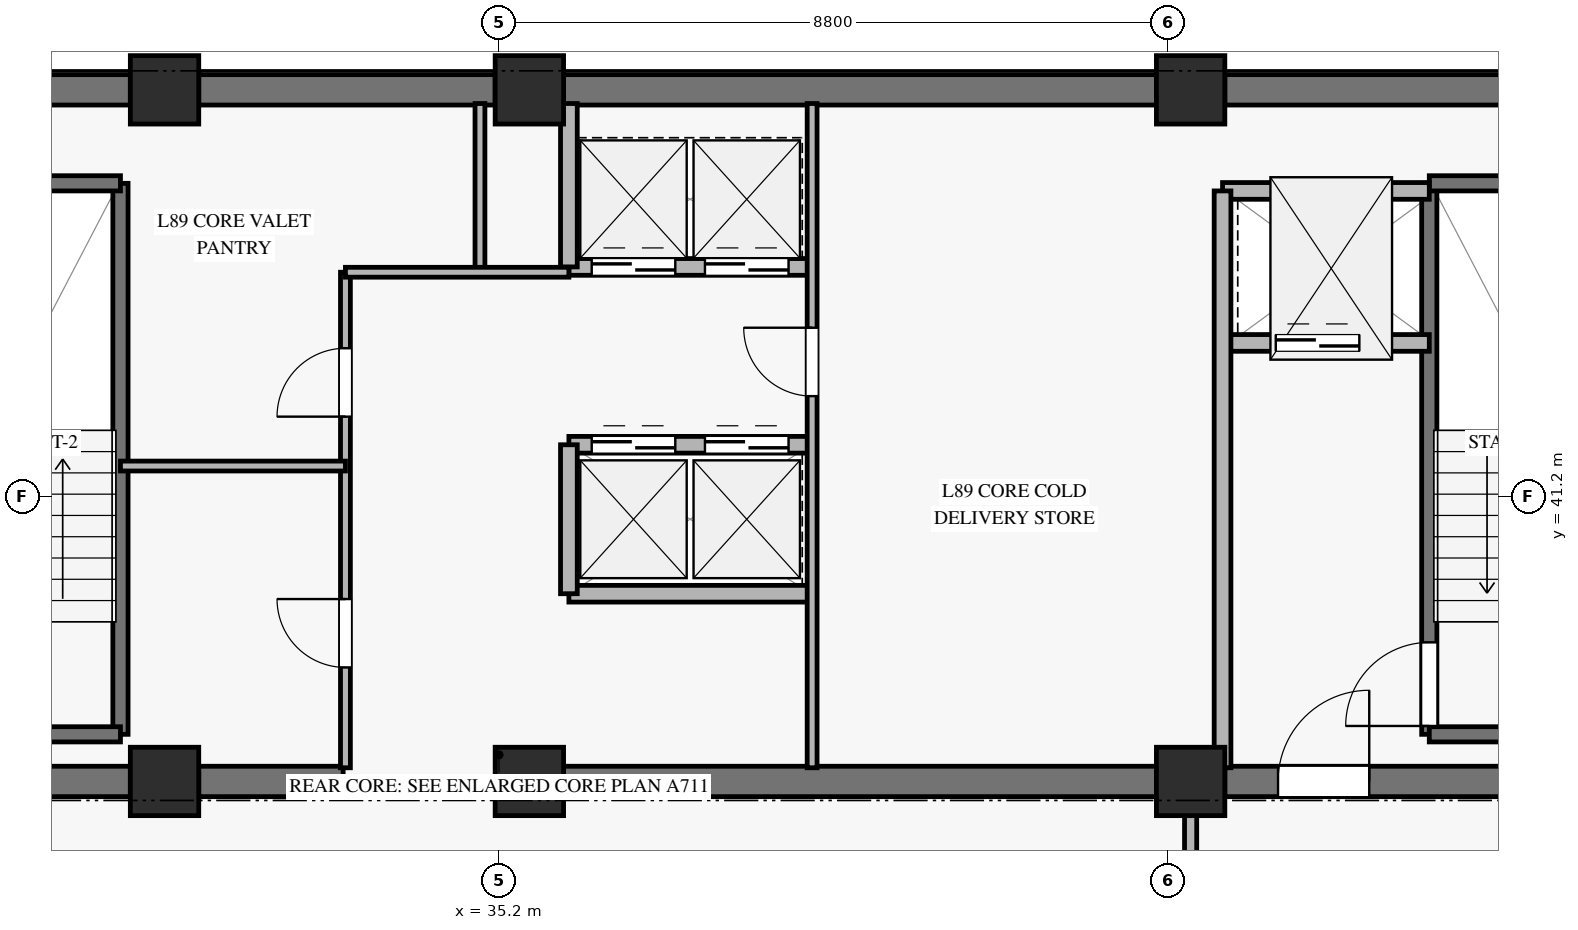
"""IFC4 building model, lengths in metres.
Left out: names, types, materials, properties, quantities, classifications, styles, units other than length and angle.
Written with IfcOpenShell. Run it as: python <this file> out.ifc"""

import sys

from ifc_helpers import new_model, si_unit, direction, frame, frame_2d, origin, origin_2d, place, context, subcontext, project, spatial, rectangle, extrude, source, transform, mapped, element, fill, save


model = new_model("IFC4")
c1 = context("Model", 3, precision=1e-05, world=origin(), true_north=direction((0.0, 1.0)))
c2 = subcontext(c1, "Body", "Model", "MODEL_VIEW")
j1 = project(units=[si_unit("LENGTHUNIT", "METRE"), si_unit("PLANEANGLEUNIT", "RADIAN")], contexts=[c1])
p1 = place(None, origin())
s1 = spatial("IfcSite", under=j1, at=p1, CompositionType="ELEMENT")
p2 = place(p1, origin())
s2 = spatial("IfcBuilding", under=s1, at=p2, CompositionType="ELEMENT")
p3 = place(p2, frame((0.0, 0.0, 342.5)))
s3 = spatial("IfcBuildingStorey", under=s2, at=p3, CompositionType="ELEMENT", Elevation=342.5)
m1 = source(origin(), c2, "Body", "SweptSolid", [
    extrude(rectangle(XDim=0.9, YDim=0.9, at=origin_2d()), origin(), (0.0, 0.0, 1.0), 3.185),
])
for number, where, z_axis, x_axis in (
    (1, (30.8, 37.45, 0.0), (0.0, 0.0, 1.0), (1.0, 0.0, 0.0)),
    (2, (30.8, 46.55, 0.0), (0.0, 0.0, 1.0), (1.0, 0.0, 0.0)),
    (3, (35.6, 37.45, 0.0), (0.0, 0.0, 1.0), (1.0, 0.0, 0.0)),
    (4, (35.6, 46.55, 0.0), (0.0, 0.0, 1.0), (1.0, 0.0, 0.0)),
    (5, (44.3, 37.45, 0.0), (0.0, 0.0, 1.0), (1.0, 0.0, 0.0)),
    (6, (44.3, 46.55, 0.0), (0.0, 0.0, 1.0), (1.0, 0.0, 0.0)),
):
    element("IfcColumn", number, at=place(p3, frame(where, z_axis=z_axis, x_axis=x_axis)), inside=s3, PredefinedType="PILASTER", context=c2, shape_type="MappedRepresentation", body=[
        mapped(m1, transform((0.0, 0.0, 0.0), x_axis=(1.0, 0.0, 0.0), y_axis=(0.0, 1.0, 0.0), z_axis=(0.0, 0.0, 1.0), scale=1.0)),
    ])
p4 = place(p3, frame((20.3, 46.55, 0.0), z_axis=(0.0, 0.0, 1.0), x_axis=(1.0, 0.0, 0.0)))
e7 = element("IfcWall", 7, at=p4, inside=s3, PredefinedType="SHEAR", context=c2, shape_type="SweptSolid", body=[
    extrude(rectangle(XDim=10.05, YDim=0.4, at=frame_2d((5.025, 0.0))), origin(), (0.0, 0.0, 1.0), 3.185),
])
p5 = place(p3, frame((31.25, 46.55, 0.0), z_axis=(0.0, 0.0, 1.0), x_axis=(1.0, 0.0, 0.0)))
e8 = element("IfcWall", 8, at=p5, inside=s3, PredefinedType="SHEAR", context=c2, shape_type="SweptSolid", body=[
    extrude(rectangle(XDim=3.9, YDim=0.4, at=frame_2d((1.95, 0.0))), origin(), (0.0, 0.0, 1.0), 3.185),
])
p6 = place(p3, frame((36.05, 46.55, 0.0), z_axis=(0.0, 0.0, 1.0), x_axis=(1.0, 0.0, 0.0)))
e9 = element("IfcWall", 9, at=p6, inside=s3, PredefinedType="SHEAR", context=c2, shape_type="SweptSolid", body=[
    extrude(rectangle(XDim=7.8, YDim=0.4, at=frame_2d((3.9, 0.0))), origin(), (0.0, 0.0, 1.0), 3.185),
])
p7 = place(p3, frame((44.75, 46.55, 0.0), z_axis=(0.0, 0.0, 1.0), x_axis=(1.0, 0.0, 0.0)))
e10 = element("IfcWall", 10, at=p7, inside=s3, PredefinedType="SHEAR", context=c2, shape_type="SweptSolid", body=[
    extrude(rectangle(XDim=5.35, YDim=0.4, at=frame_2d((2.675, 0.0))), origin(), (0.0, 0.0, 1.0), 3.185),
])
p8 = place(p3, frame((20.3, 37.45, 0.0), z_axis=(0.0, 0.0, 1.0), x_axis=(1.0, 0.0, 0.0)))
e11 = element("IfcWall", 11, at=p8, inside=s3, PredefinedType="SHEAR", context=c2, shape_type="SweptSolid", body=[
    extrude(rectangle(XDim=10.05, YDim=0.4, at=frame_2d((5.025, 0.0))), origin(), (0.0, 0.0, 1.0), 3.185),
])
p9 = place(p8, frame((4.25, 0.0, 0.0)))
e12 = element("IfcOpeningElement", 12, at=p9, cuts=e11, PredefinedType="OPENING", context=c2, shape_type="SweptSolid", body=[
    extrude(rectangle(XDim=1.2, YDim=2.15, at=frame_2d((0.6, 1.075))), frame((0.0, 0.21, 0.0), z_axis=(0.0, -1.0, 0.0), x_axis=(1.0, 0.0, 0.0)), (0.0, 0.0, 1.0), 0.42),
])
p10 = place(p3, frame((31.25, 37.45, 0.0), z_axis=(0.0, 0.0, 1.0), x_axis=(1.0, 0.0, 0.0)))
e13 = element("IfcWall", 13, at=p10, inside=s3, PredefinedType="SHEAR", context=c2, shape_type="SweptSolid", body=[
    extrude(rectangle(XDim=1.9, YDim=0.4, at=frame_2d((0.95, 0.0))), origin(), (0.0, 0.0, 1.0), 3.185),
])
p11 = place(p3, frame((36.05, 37.45, 0.0), z_axis=(0.0, 0.0, 1.0), x_axis=(1.0, 0.0, 0.0)))
e14 = element("IfcWall", 14, at=p11, inside=s3, PredefinedType="SHEAR", context=c2, shape_type="SweptSolid", body=[
    extrude(rectangle(XDim=7.8, YDim=0.4, at=frame_2d((3.9, 0.0))), origin(), (0.0, 0.0, 1.0), 3.185),
])
p12 = place(p3, frame((44.75, 37.45, 0.0), z_axis=(0.0, 0.0, 1.0), x_axis=(1.0, 0.0, 0.0)))
e15 = element("IfcWall", 15, at=p12, inside=s3, PredefinedType="SHEAR", context=c2, shape_type="SweptSolid", body=[
    extrude(rectangle(XDim=5.35, YDim=0.4, at=frame_2d((2.675, 0.0))), origin(), (0.0, 0.0, 1.0), 3.185),
])
p13 = place(p12, frame((0.7, 0.0, 0.0)))
e16 = element("IfcOpeningElement", 16, at=p13, cuts=e15, PredefinedType="OPENING", context=c2, shape_type="SweptSolid", body=[
    extrude(rectangle(XDim=1.2, YDim=2.15, at=frame_2d((0.6, 1.075))), frame((0.0, 0.21, 0.0), z_axis=(0.0, -1.0, 0.0), x_axis=(1.0, 0.0, 0.0)), (0.0, 0.0, 1.0), 0.42),
])
p14 = place(p3, frame((30.22, 38.07, 0.0), z_axis=(0.0, 0.0, 1.0), x_axis=(0.0, 1.0, 0.0)))
e17 = element("IfcWall", 17, at=p14, inside=s3, PredefinedType="SOLIDWALL", context=c2, shape_type="SweptSolid", body=[
    extrude(rectangle(XDim=7.25, YDim=0.2, at=frame_2d((3.625, 0.0))), origin(), (0.0, 0.0, 1.0), 3.4),
])
for number, where, z_axis, x_axis in (
    (18, (27.14, 45.32, 0.0), (0.0, 0.0, 1.0), (1.0, 0.0, 0.0)),
    (19, (27.14, 38.07, 0.0), (0.0, 0.0, 1.0), (1.0, 0.0, 0.0)),
):
    element("IfcWall", number, at=place(p3, frame(where, z_axis=z_axis, x_axis=x_axis)), inside=s3, PredefinedType="SOLIDWALL", context=c2, shape_type="SweptSolid", body=[
        extrude(rectangle(XDim=3.08, YDim=0.2, at=frame_2d((1.54, 0.0))), origin(), (0.0, 0.0, 1.0), 3.4),
    ])
p15 = place(p3, frame((47.44, 38.07, 0.0), z_axis=(0.0, 0.0, 1.0), x_axis=(0.0, 1.0, 0.0)))
e20 = element("IfcWall", 20, at=p15, inside=s3, PredefinedType="SOLIDWALL", context=c2, shape_type="SweptSolid", body=[
    extrude(rectangle(XDim=7.25, YDim=0.2, at=frame_2d((3.625, 0.0))), origin(), (0.0, 0.0, 1.0), 3.4),
])
p16 = place(p15, frame((0.11, 0.0, 0.0)))
e21 = element("IfcOpeningElement", 21, at=p16, cuts=e20, PredefinedType="OPENING", context=c2, shape_type="SweptSolid", body=[
    extrude(rectangle(XDim=1.1, YDim=2.15, at=frame_2d((0.55, 1.075))), frame((0.0, 0.11, 0.0), z_axis=(0.0, -1.0, 0.0), x_axis=(1.0, 0.0, 0.0)), (0.0, 0.0, 1.0), 0.22),
])
for number, where, z_axis, x_axis in (
    (22, (47.44, 45.32, 0.0), (0.0, 0.0, 1.0), (1.0, 0.0, 0.0)),
    (23, (47.44, 38.07, 0.0), (0.0, 0.0, 1.0), (1.0, 0.0, 0.0)),
):
    element("IfcWall", number, at=place(p3, frame(where, z_axis=z_axis, x_axis=x_axis)), inside=s3, PredefinedType="SOLIDWALL", context=c2, shape_type="SweptSolid", body=[
        extrude(rectangle(XDim=2.93, YDim=0.2, at=frame_2d((1.465, 0.0))), origin(), (0.0, 0.0, 1.0), 3.4),
    ])
p17 = place(p3, frame((44.72, 43.22, 0.0), z_axis=(0.0, 0.0, 1.0), x_axis=(1.0, 0.0, 0.0)))
e24 = element("IfcWall", 24, at=p17, inside=s3, PredefinedType="SOLIDWALL", context=c2, shape_type="SweptSolid", body=[
    extrude(rectangle(XDim=2.72, YDim=0.22, at=frame_2d((1.36, 0.0))), origin(), (0.0, 0.0, 1.0), 3.185),
])
p18 = place(p17, frame((0.7, 0.0, 0.0)))
e25 = element("IfcOpeningElement", 25, at=p18, cuts=e24, PredefinedType="OPENING", context=c2, shape_type="SweptSolid", body=[
    extrude(rectangle(XDim=1.1, YDim=2.2, at=frame_2d((0.55, 1.1))), frame((0.0, 0.12, 0.0), z_axis=(0.0, -1.0, 0.0), x_axis=(1.0, 0.0, 0.0)), (0.0, 0.0, 1.0), 0.24),
])
p19 = place(p3, frame((44.72, 45.22, 0.0), z_axis=(0.0, 0.0, 1.0), x_axis=(1.0, 0.0, 0.0)))
e26 = element("IfcWall", 26, at=p19, inside=s3, PredefinedType="SOLIDWALL", context=c2, shape_type="SweptSolid", body=[
    extrude(rectangle(XDim=2.72, YDim=0.22, at=frame_2d((1.36, 0.0))), origin(), (0.0, 0.0, 1.0), 3.185),
])
p20 = place(p3, frame((44.72, 37.63, 0.0), z_axis=(0.0, 0.0, 1.0), x_axis=(0.0, 1.0, 0.0)))
e27 = element("IfcWall", 27, at=p20, inside=s3, PredefinedType="SOLIDWALL", context=c2, shape_type="SweptSolid", body=[
    extrude(rectangle(XDim=7.59, YDim=0.22, at=frame_2d((3.795, 0.0))), origin(), (0.0, 0.0, 1.0), 3.185),
])
p21 = place(p3, frame((36.12, 44.22, 0.0), z_axis=(0.0, 0.0, 1.0), x_axis=(1.0, 0.0, 0.0)))
e28 = element("IfcWall", 28, at=p21, inside=s3, PredefinedType="SOLIDWALL", context=c2, shape_type="SweptSolid", body=[
    extrude(rectangle(XDim=3.2, YDim=0.22, at=frame_2d((1.6, 0.0))), origin(), (0.0, 0.0, 1.0), 3.185),
])
p22 = place(p21, frame((0.3, 0.0, 0.0)))
e29 = element("IfcOpeningElement", 29, at=p22, cuts=e28, PredefinedType="OPENING", context=c2, shape_type="SweptSolid", body=[
    extrude(rectangle(XDim=1.1, YDim=2.2, at=frame_2d((0.55, 1.1))), frame((0.0, 0.12, 0.0), z_axis=(0.0, -1.0, 0.0), x_axis=(1.0, 0.0, 0.0)), (0.0, 0.0, 1.0), 0.24),
])
p23 = place(p21, frame((1.79, 0.0, 0.0)))
e30 = element("IfcOpeningElement", 30, at=p23, cuts=e28, PredefinedType="OPENING", context=c2, shape_type="SweptSolid", body=[
    extrude(rectangle(XDim=1.1, YDim=2.2, at=frame_2d((0.55, 1.1))), frame((0.0, 0.12, 0.0), z_axis=(0.0, -1.0, 0.0), x_axis=(1.0, 0.0, 0.0)), (0.0, 0.0, 1.0), 0.24),
])
p24 = place(p3, frame((36.12, 41.88, 0.0), z_axis=(0.0, 0.0, 1.0), x_axis=(1.0, 0.0, 0.0)))
e31 = element("IfcWall", 31, at=p24, inside=s3, PredefinedType="SOLIDWALL", context=c2, shape_type="SweptSolid", body=[
    extrude(rectangle(XDim=3.2, YDim=0.22, at=frame_2d((1.6, 0.0))), origin(), (0.0, 0.0, 1.0), 3.185),
])
p25 = place(p24, frame((0.3, 0.0, 0.0)))
e32 = element("IfcOpeningElement", 32, at=p25, cuts=e31, PredefinedType="OPENING", context=c2, shape_type="SweptSolid", body=[
    extrude(rectangle(XDim=1.1, YDim=2.2, at=frame_2d((0.55, 1.1))), frame((0.0, 0.12, 0.0), z_axis=(0.0, -1.0, 0.0), x_axis=(1.0, 0.0, 0.0)), (0.0, 0.0, 1.0), 0.24),
])
p26 = place(p24, frame((1.79, 0.0, 0.0)))
e33 = element("IfcOpeningElement", 33, at=p26, cuts=e31, PredefinedType="OPENING", context=c2, shape_type="SweptSolid", body=[
    extrude(rectangle(XDim=1.1, YDim=2.2, at=frame_2d((0.55, 1.1))), frame((0.0, 0.12, 0.0), z_axis=(0.0, -1.0, 0.0), x_axis=(1.0, 0.0, 0.0)), (0.0, 0.0, 1.0), 0.24),
])
p27 = place(p3, frame((36.12, 39.92, 0.0), z_axis=(0.0, 0.0, 1.0), x_axis=(1.0, 0.0, 0.0)))
e34 = element("IfcWall", 34, at=p27, inside=s3, PredefinedType="SOLIDWALL", context=c2, shape_type="SweptSolid", body=[
    extrude(rectangle(XDim=3.2, YDim=0.22, at=frame_2d((1.6, 0.0))), origin(), (0.0, 0.0, 1.0), 3.185),
])
p28 = place(p3, frame((36.12, 39.92, 0.0), z_axis=(0.0, 0.0, 1.0), x_axis=(0.0, 1.0, 0.0)))
e35 = element("IfcWall", 35, at=p28, inside=s3, PredefinedType="SOLIDWALL", context=c2, shape_type="SweptSolid", body=[
    extrude(rectangle(XDim=1.96, YDim=0.22, at=frame_2d((0.98, 0.0))), origin(), (0.0, 0.0, 1.0), 3.185),
])
p29 = place(p3, frame((36.12, 44.22, 0.0), z_axis=(0.0, 0.0, 1.0), x_axis=(0.0, 1.0, 0.0)))
e36 = element("IfcWall", 36, at=p29, inside=s3, PredefinedType="SOLIDWALL", context=c2, shape_type="SweptSolid", body=[
    extrude(rectangle(XDim=2.15, YDim=0.22, at=frame_2d((1.075, 0.0))), origin(), (0.0, 0.0, 1.0), 3.185),
])
p30 = place(p3, frame((33.18, 37.63, 0.0), z_axis=(0.0, 0.0, 1.0), x_axis=(0.0, 1.0, 0.0)))
e37 = element("IfcWall", 37, at=p30, inside=s3, PredefinedType="PARTITIONING", context=c2, shape_type="SweptSolid", body=[
    extrude(rectangle(XDim=6.52, YDim=0.13, at=frame_2d((3.26, 0.0))), origin(), (0.0, 0.0, 1.0), 2.27),
])
p31 = place(p30, frame((1.32, 0.0, 0.0)))
e38 = element("IfcOpeningElement", 38, at=p31, cuts=e37, PredefinedType="OPENING", context=c2, shape_type="SweptSolid", body=[
    extrude(rectangle(XDim=0.9, YDim=2.1, at=frame_2d((0.45, 1.05))), frame((0.0, 0.075, 0.0), z_axis=(0.0, -1.0, 0.0), x_axis=(1.0, 0.0, 0.0)), (0.0, 0.0, 1.0), 0.15),
])
p32 = place(p30, frame((4.62, 0.0, 0.0)))
e39 = element("IfcOpeningElement", 39, at=p32, cuts=e37, PredefinedType="OPENING", context=c2, shape_type="SweptSolid", body=[
    extrude(rectangle(XDim=0.9, YDim=2.1, at=frame_2d((0.45, 1.05))), frame((0.0, 0.075, 0.0), z_axis=(0.0, -1.0, 0.0), x_axis=(1.0, 0.0, 0.0)), (0.0, 0.0, 1.0), 0.15),
])
p33 = place(p3, frame((34.95, 44.15, 0.0), z_axis=(0.0, 0.0, 1.0), x_axis=(0.0, 1.0, 0.0)))
e40 = element("IfcWall", 40, at=p33, inside=s3, PredefinedType="PARTITIONING", context=c2, shape_type="SweptSolid", body=[
    extrude(rectangle(XDim=2.22, YDim=0.13, at=frame_2d((1.11, 0.0))), origin(), (0.0, 0.0, 1.0), 3.185),
])
p34 = place(p3, frame((33.18, 44.15, 0.0), z_axis=(0.0, 0.0, 1.0), x_axis=(1.0, 0.0, 0.0)))
e41 = element("IfcWall", 41, at=p34, inside=s3, PredefinedType="PARTITIONING", context=c2, shape_type="SweptSolid", body=[
    extrude(rectangle(XDim=2.94, YDim=0.13, at=frame_2d((1.47, 0.0))), origin(), (0.0, 0.0, 1.0), 2.47),
])
p35 = place(p3, frame((39.32, 37.63, 0.0), z_axis=(0.0, 0.0, 1.0), x_axis=(0.0, 1.0, 0.0)))
e42 = element("IfcWall", 42, at=p35, inside=s3, PredefinedType="PARTITIONING", context=c2, shape_type="SweptSolid", body=[
    extrude(rectangle(XDim=8.74, YDim=0.13, at=frame_2d((4.37, 0.0))), origin(), (0.0, 0.0, 1.0), 3.185),
])
p36 = place(p35, frame((4.89, 0.0, 0.0)))
e43 = element("IfcOpeningElement", 43, at=p36, cuts=e42, PredefinedType="OPENING", context=c2, shape_type="SweptSolid", body=[
    extrude(rectangle(XDim=0.9, YDim=2.1, at=frame_2d((0.45, 1.05))), frame((0.0, 0.075, 0.0), z_axis=(0.0, -1.0, 0.0), x_axis=(1.0, 0.0, 0.0)), (0.0, 0.0, 1.0), 0.15),
])
p37 = place(p3, frame((30.22, 41.6, 0.0), z_axis=(0.0, 0.0, 1.0), x_axis=(1.0, 0.0, 0.0)))
e44 = element("IfcWall", 44, at=p37, inside=s3, PredefinedType="PARTITIONING", context=c2, shape_type="SweptSolid", body=[
    extrude(rectangle(XDim=2.96, YDim=0.13, at=frame_2d((1.48, 0.0))), origin(), (0.0, 0.0, 1.0), 2.47),
])
p38 = place(p3, frame((44.3, 22.568, 0.0), z_axis=(0.0, 0.0, 1.0), x_axis=(0.0, 1.0, 0.0)))
e45 = element("IfcWall", 45, at=p38, inside=s3, PredefinedType="PARTITIONING", context=c2, shape_type="SweptSolid", body=[
    extrude(rectangle(XDim=14.882, YDim=0.16, at=frame_2d((7.441, 0.0))), origin(), (0.0, 0.0, 1.0), 2.47),
])
p39 = place(p38, frame((12.352, 0.0, 0.0)))
e46 = element("IfcOpeningElement", 46, at=p39, cuts=e45, PredefinedType="OPENING", context=c2, shape_type="SweptSolid", body=[
    extrude(rectangle(XDim=1.05, YDim=2.15, at=frame_2d((0.525, 1.075))), frame((0.0, 0.09, 0.0), z_axis=(0.0, -1.0, 0.0), x_axis=(1.0, 0.0, 0.0)), (0.0, 0.0, 1.0), 0.18),
])
m2 = source(origin(), c2, "Body", "SweptSolid", [
    extrude(rectangle(XDim=1.1, YDim=2.15, at=frame_2d((0.55, 1.075))), frame((0.0, 0.025, 0.0), z_axis=(0.0, -1.0, 0.0), x_axis=(1.0, 0.0, 0.0)), (0.0, 0.0, 1.0), 0.05),
])
p40 = place(p16, origin())
e47 = element("IfcDoor", 47, at=p40, inside=s3, OperationType="SINGLE_SWING_LEFT", PredefinedType="DOOR", context=c2, shape_type="MappedRepresentation", body=[
    mapped(m2, transform((0.0, 0.0, 0.0), x_axis=(1.0, 0.0, 0.0), y_axis=(0.0, 1.0, 0.0), z_axis=(0.0, 0.0, 1.0), scale=1.0)),
])
fill(e21, e47)
m3 = source(origin(), c2, "Body", "SweptSolid", [
    extrude(rectangle(XDim=1.1, YDim=2.2, at=frame_2d((0.55, 1.1))), frame((0.0, 0.025, 0.0), z_axis=(0.0, -1.0, 0.0), x_axis=(1.0, 0.0, 0.0)), (0.0, 0.0, 1.0), 0.05),
])
p41 = place(p18, origin())
e48 = element("IfcDoor", 48, at=p41, inside=s3, OperationType="SLIDING_TO_LEFT", PredefinedType="DOOR", context=c2, shape_type="MappedRepresentation", body=[
    mapped(m3, transform((0.0, 0.0, 0.0), x_axis=(1.0, 0.0, 0.0), y_axis=(0.0, 1.0, 0.0), z_axis=(0.0, 0.0, 1.0), scale=1.0)),
])
fill(e25, e48)
m4 = source(origin(), c2, "Body", "SweptSolid", [
    extrude(rectangle(XDim=1.2, YDim=2.15, at=frame_2d((0.6, 1.075))), frame((0.0, 0.025, 0.0), z_axis=(0.0, -1.0, 0.0), x_axis=(1.0, 0.0, 0.0)), (0.0, 0.0, 1.0), 0.05),
])
p42 = place(p13, origin())
e49 = element("IfcDoor", 49, at=p42, inside=s3, OperationType="SINGLE_SWING_RIGHT", PredefinedType="DOOR", context=c2, shape_type="MappedRepresentation", body=[
    mapped(m4, transform((0.0, 0.0, 0.0), x_axis=(1.0, 0.0, 0.0), y_axis=(0.0, 1.0, 0.0), z_axis=(0.0, 0.0, 1.0), scale=1.0)),
])
fill(e16, e49)
p43 = place(p22, origin())
e50 = element("IfcDoor", 50, at=p43, inside=s3, OperationType="SLIDING_TO_LEFT", PredefinedType="DOOR", context=c2, shape_type="MappedRepresentation", body=[
    mapped(m3, transform((0.0, 0.0, 0.0), x_axis=(1.0, 0.0, 0.0), y_axis=(0.0, 1.0, 0.0), z_axis=(0.0, 0.0, 1.0), scale=1.0)),
])
fill(e29, e50)
p44 = place(p23, origin())
e51 = element("IfcDoor", 51, at=p44, inside=s3, OperationType="SLIDING_TO_LEFT", PredefinedType="DOOR", context=c2, shape_type="MappedRepresentation", body=[
    mapped(m3, transform((0.0, 0.0, 0.0), x_axis=(1.0, 0.0, 0.0), y_axis=(0.0, 1.0, 0.0), z_axis=(0.0, 0.0, 1.0), scale=1.0)),
])
fill(e30, e51)
p45 = place(p25, origin())
e52 = element("IfcDoor", 52, at=p45, inside=s3, OperationType="SLIDING_TO_LEFT", PredefinedType="DOOR", context=c2, shape_type="MappedRepresentation", body=[
    mapped(m3, transform((0.0, 0.0, 0.0), x_axis=(1.0, 0.0, 0.0), y_axis=(0.0, 1.0, 0.0), z_axis=(0.0, 0.0, 1.0), scale=1.0)),
])
fill(e32, e52)
p46 = place(p26, origin())
e53 = element("IfcDoor", 53, at=p46, inside=s3, OperationType="SLIDING_TO_LEFT", PredefinedType="DOOR", context=c2, shape_type="MappedRepresentation", body=[
    mapped(m3, transform((0.0, 0.0, 0.0), x_axis=(1.0, 0.0, 0.0), y_axis=(0.0, 1.0, 0.0), z_axis=(0.0, 0.0, 1.0), scale=1.0)),
])
fill(e33, e53)
m5 = source(origin(), c2, "Body", "SweptSolid", [
    extrude(rectangle(XDim=0.9, YDim=2.1, at=frame_2d((0.45, 1.05))), frame((0.0, 0.025, 0.0), z_axis=(0.0, -1.0, 0.0), x_axis=(1.0, 0.0, 0.0)), (0.0, 0.0, 1.0), 0.05),
])
p47 = place(p31, origin())
e54 = element("IfcDoor", 54, at=p47, inside=s3, OperationType="SINGLE_SWING_RIGHT", PredefinedType="DOOR", context=c2, shape_type="MappedRepresentation", body=[
    mapped(m5, transform((0.0, 0.0, 0.0), x_axis=(1.0, 0.0, 0.0), y_axis=(0.0, 1.0, 0.0), z_axis=(0.0, 0.0, 1.0), scale=1.0)),
])
fill(e38, e54)
p48 = place(p32, origin())
e55 = element("IfcDoor", 55, at=p48, inside=s3, OperationType="SINGLE_SWING_LEFT", PredefinedType="DOOR", context=c2, shape_type="MappedRepresentation", body=[
    mapped(m5, transform((0.0, 0.0, 0.0), x_axis=(1.0, 0.0, 0.0), y_axis=(0.0, 1.0, 0.0), z_axis=(0.0, 0.0, 1.0), scale=1.0)),
])
fill(e39, e55)
p49 = place(p36, origin())
e56 = element("IfcDoor", 56, at=p49, inside=s3, OperationType="SINGLE_SWING_RIGHT", PredefinedType="DOOR", context=c2, shape_type="MappedRepresentation", body=[
    mapped(m5, transform((0.0, 0.0, 0.0), x_axis=(1.0, 0.0, 0.0), y_axis=(0.0, 1.0, 0.0), z_axis=(0.0, 0.0, 1.0), scale=1.0)),
])
fill(e43, e56)
save(model, sys.argv[1])
